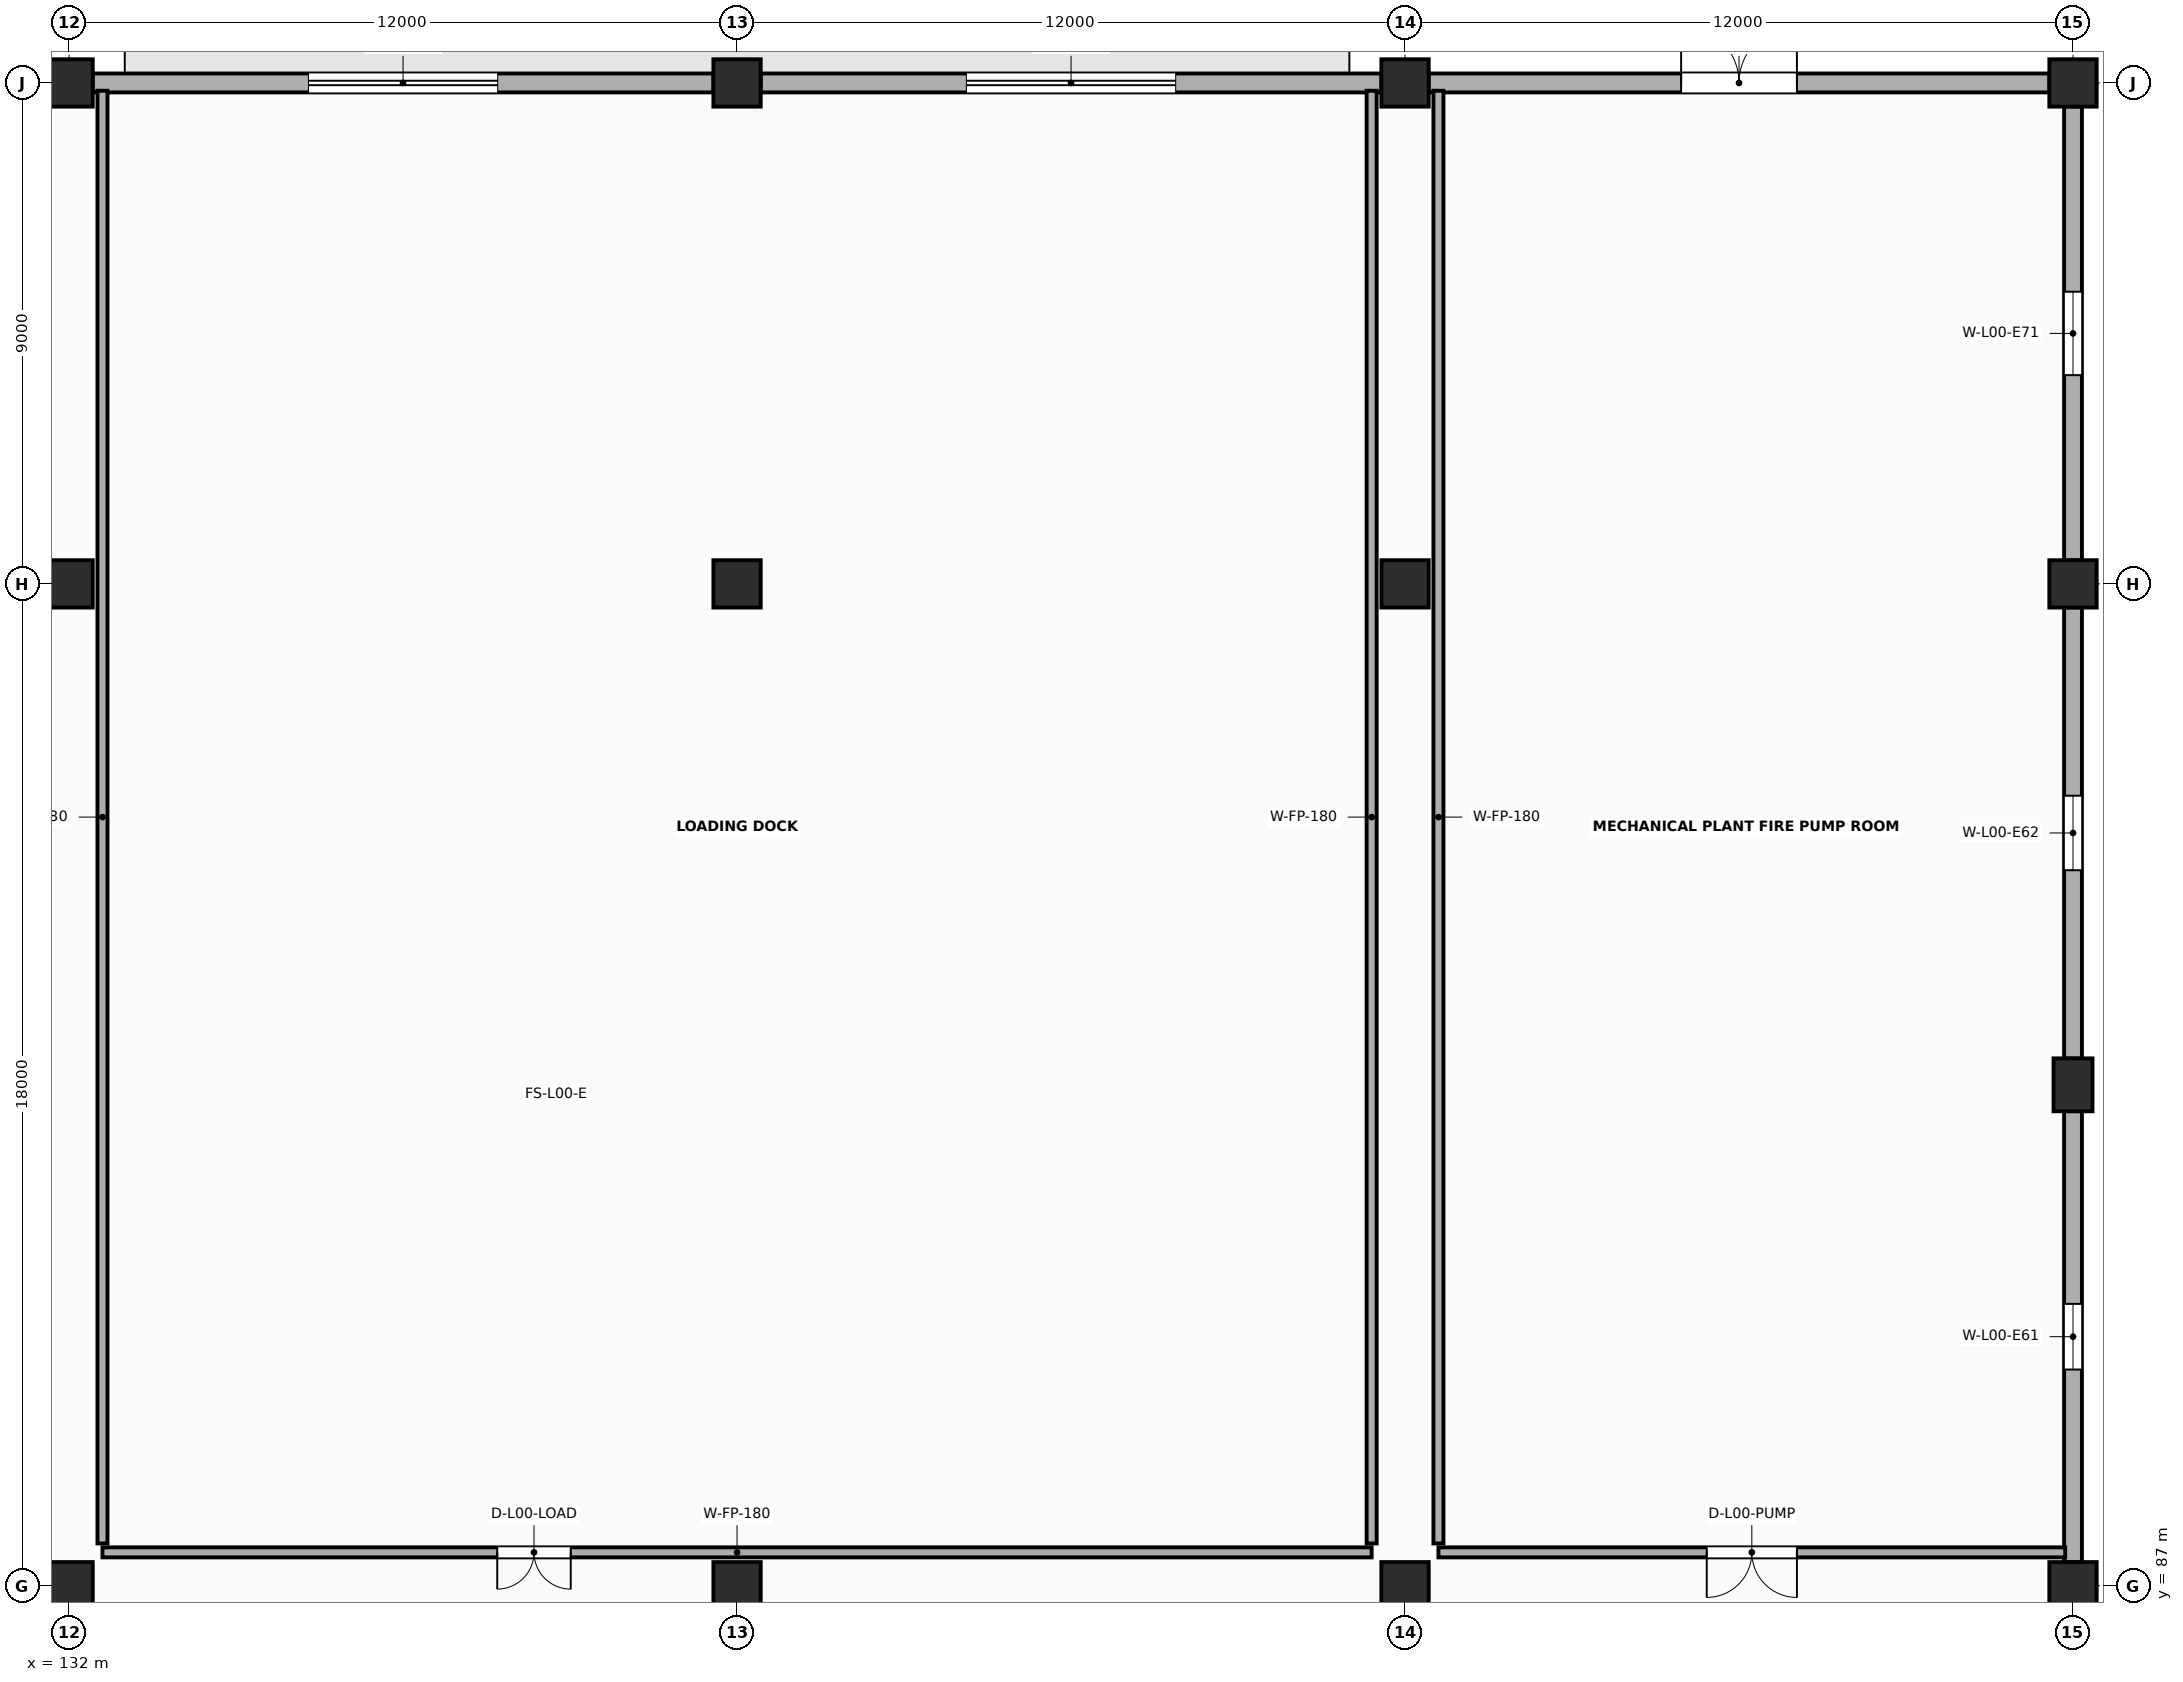
"""IFC4 building model, lengths in metres.
Left out: names, types, materials, properties, quantities, classifications, styles, units other than length and angle.
Written with IfcOpenShell. Run it as: python <this file> out.ifc"""

import sys

from ifc_helpers import new_model, si_unit, direction, frame, frame_2d, origin, origin_2d, place, context, subcontext, project, spatial, rectangle, extrude, element, fill, save


model = new_model("IFC4")
c1 = context("Model", 3, precision=1e-05, world=origin(), true_north=direction((0.0, 1.0)))
c2 = subcontext(c1, "Body", "Model", "MODEL_VIEW")
j1 = project(units=[si_unit("LENGTHUNIT", "METRE"), si_unit("PLANEANGLEUNIT", "RADIAN")], contexts=[c1])
p1 = place(None, origin())
s1 = spatial("IfcSite", under=j1, at=p1, CompositionType="ELEMENT")
p2 = place(p1, origin())
s2 = spatial("IfcBuilding", under=s1, at=p2, CompositionType="ELEMENT")
p3 = place(p2, origin())
s3 = spatial("IfcBuildingStorey", under=s2, at=p3, CompositionType="ELEMENT", Elevation=0.0)
for number, where, z_axis, x_axis in (
    (1, (132.0, 87.0, 0.0), (0.0, 0.0, 1.0), (1.0, 0.0, 0.0)),
    (2, (132.0, 105.0, 0.0), (0.0, 0.0, 1.0), (1.0, 0.0, 0.0)),
    (3, (132.0, 114.0, 0.0), (0.0, 0.0, 1.0), (1.0, 0.0, 0.0)),
    (4, (144.0, 87.0, 0.0), (0.0, 0.0, 1.0), (1.0, 0.0, 0.0)),
    (5, (144.0, 105.0, 0.0), (0.0, 0.0, 1.0), (1.0, 0.0, 0.0)),
    (6, (144.0, 114.0, 0.0), (0.0, 0.0, 1.0), (1.0, 0.0, 0.0)),
    (7, (156.0, 87.0, 0.0), (0.0, 0.0, 1.0), (1.0, 0.0, 0.0)),
    (8, (156.0, 105.0, 0.0), (0.0, 0.0, 1.0), (1.0, 0.0, 0.0)),
    (9, (156.0, 114.0, 0.0), (0.0, 0.0, 1.0), (1.0, 0.0, 0.0)),
    (10, (168.0, 87.0, 0.0), (0.0, 0.0, 1.0), (1.0, 0.0, 0.0)),
    (11, (168.0, 105.0, 0.0), (0.0, 0.0, 1.0), (1.0, 0.0, 0.0)),
    (12, (168.0, 114.0, 0.0), (0.0, 0.0, 1.0), (1.0, 0.0, 0.0)),
):
    element("IfcColumn", number, at=place(p3, frame(where, z_axis=z_axis, x_axis=x_axis)), inside=s3, PredefinedType="COLUMN", context=c2, shape_type="SweptSolid", body=[
        extrude(rectangle(XDim=0.85, YDim=0.85, at=origin_2d()), origin(), (0.0, 0.0, 1.0), 5.4),
    ])
p4 = place(p3, frame((168.0, 96.0, 0.0), z_axis=(0.0, 0.0, 1.0), x_axis=(1.0, 0.0, 0.0)))
e13 = element("IfcColumn", 13, at=p4, inside=s3, PredefinedType="PILASTER", context=c2, shape_type="SweptSolid", body=[
    extrude(rectangle(XDim=0.7, YDim=0.95, at=origin_2d()), origin(), (0.0, 0.0, 1.0), 5.4),
])
p5 = place(p3, frame((132.423, 114.0, 0.0), z_axis=(0.0, 0.0, 1.0), x_axis=(1.0, 0.0, 0.0)))
e14 = element("IfcWall", 14, at=p5, inside=s3, PredefinedType="SOLIDWALL", context=c2, shape_type="SweptSolid", body=[
    extrude(rectangle(XDim=11.154, YDim=0.34, at=frame_2d((5.577, 0.0))), origin(), (0.0, 0.0, 1.0), 3.85),
])
p6 = place(p5, frame((3.877, 0.0, 0.0)))
e15 = element("IfcOpeningElement", 15, at=p6, cuts=e14, PredefinedType="OPENING", context=c2, shape_type="SweptSolid", body=[
    extrude(rectangle(XDim=3.4, YDim=2.85, at=frame_2d((1.7, 1.425))), frame((0.0, 0.185, 0.0), z_axis=(0.0, -1.0, 0.0), x_axis=(1.0, 0.0, 0.0)), (0.0, 0.0, 1.0), 0.37),
])
p7 = place(p3, frame((144.423, 114.0, 0.0), z_axis=(0.0, 0.0, 1.0), x_axis=(1.0, 0.0, 0.0)))
e16 = element("IfcWall", 16, at=p7, inside=s3, PredefinedType="SOLIDWALL", context=c2, shape_type="SweptSolid", body=[
    extrude(rectangle(XDim=11.154, YDim=0.34, at=frame_2d((5.577, 0.0))), origin(), (0.0, 0.0, 1.0), 3.85),
])
p8 = place(p7, frame((3.697, 0.0, 0.0)))
e17 = element("IfcOpeningElement", 17, at=p8, cuts=e16, PredefinedType="OPENING", context=c2, shape_type="SweptSolid", body=[
    extrude(rectangle(XDim=3.76, YDim=3.0, at=frame_2d((1.88, 1.5))), frame((0.0, 0.185, 0.0), z_axis=(0.0, -1.0, 0.0), x_axis=(1.0, 0.0, 0.0)), (0.0, 0.0, 1.0), 0.37),
])
p9 = place(p3, frame((156.423, 114.0, 0.0), z_axis=(0.0, 0.0, 1.0), x_axis=(1.0, 0.0, 0.0)))
e18 = element("IfcWall", 18, at=p9, inside=s3, PredefinedType="SOLIDWALL", context=c2, shape_type="SweptSolid", body=[
    extrude(rectangle(XDim=11.154, YDim=0.34, at=frame_2d((5.577, 0.0))), origin(), (0.0, 0.0, 1.0), 3.85),
])
p10 = place(p9, frame((4.537, 0.0, 0.0)))
e19 = element("IfcOpeningElement", 19, at=p10, cuts=e18, PredefinedType="OPENING", context=c2, shape_type="SweptSolid", body=[
    extrude(rectangle(XDim=2.08, YDim=2.44, at=frame_2d((1.04, 1.22))), frame((0.0, 0.185, 0.0), z_axis=(0.0, -1.0, 0.0), x_axis=(1.0, 0.0, 0.0)), (0.0, 0.0, 1.0), 0.37),
])
p11 = place(p3, frame((168.0, 87.423, 0.0), z_axis=(0.0, 0.0, 1.0), x_axis=(0.0, 1.0, 0.0)))
e20 = element("IfcWall", 20, at=p11, inside=s3, PredefinedType="SOLIDWALL", context=c2, shape_type="SweptSolid", body=[
    extrude(rectangle(XDim=8.104, YDim=0.32, at=frame_2d((4.052, 0.0))), origin(), (0.0, 0.0, 1.0), 3.85),
])
p12 = place(p11, frame((3.462, 0.0, 0.55)))
e21 = element("IfcOpeningElement", 21, at=p12, cuts=e20, PredefinedType="OPENING", context=c2, shape_type="SweptSolid", body=[
    extrude(rectangle(XDim=1.18, YDim=1.58, at=frame_2d((0.59, 0.79))), frame((0.0, 0.175, 0.0), z_axis=(0.0, -1.0, 0.0), x_axis=(1.0, 0.0, 0.0)), (0.0, 0.0, 1.0), 0.35),
])
p13 = place(p3, frame((168.0, 96.473, 0.0), z_axis=(0.0, 0.0, 1.0), x_axis=(0.0, 1.0, 0.0)))
e22 = element("IfcWall", 22, at=p13, inside=s3, PredefinedType="SOLIDWALL", context=c2, shape_type="SweptSolid", body=[
    extrude(rectangle(XDim=8.104, YDim=0.32, at=frame_2d((4.052, 0.0))), origin(), (0.0, 0.0, 1.0), 3.85),
])
p14 = place(p13, frame((3.382, 0.0, 0.55)))
e23 = element("IfcOpeningElement", 23, at=p14, cuts=e22, PredefinedType="OPENING", context=c2, shape_type="SweptSolid", body=[
    extrude(rectangle(XDim=1.34, YDim=1.58, at=frame_2d((0.67, 0.79))), frame((0.0, 0.175, 0.0), z_axis=(0.0, -1.0, 0.0), x_axis=(1.0, 0.0, 0.0)), (0.0, 0.0, 1.0), 0.35),
])
p15 = place(p3, frame((168.0, 105.423, 0.0), z_axis=(0.0, 0.0, 1.0), x_axis=(0.0, 1.0, 0.0)))
e24 = element("IfcWall", 24, at=p15, inside=s3, PredefinedType="SOLIDWALL", context=c2, shape_type="SweptSolid", body=[
    extrude(rectangle(XDim=8.154, YDim=0.32, at=frame_2d((4.077, 0.0))), origin(), (0.0, 0.0, 1.0), 3.85),
])
p16 = place(p15, frame((3.327, 0.0, 0.55)))
e25 = element("IfcOpeningElement", 25, at=p16, cuts=e24, PredefinedType="OPENING", context=c2, shape_type="SweptSolid", body=[
    extrude(rectangle(XDim=1.5, YDim=1.58, at=frame_2d((0.75, 0.79))), frame((0.0, 0.175, 0.0), z_axis=(0.0, -1.0, 0.0), x_axis=(1.0, 0.0, 0.0)), (0.0, 0.0, 1.0), 0.35),
])
p17 = place(p3, frame((132.6, 87.6, 0.0), z_axis=(0.0, 0.0, 1.0), x_axis=(1.0, 0.0, 0.0)))
e26 = element("IfcWall", 26, at=p17, inside=s3, PredefinedType="SOLIDWALL", context=c2, shape_type="SweptSolid", body=[
    extrude(rectangle(XDim=22.8, YDim=0.18, at=frame_2d((11.4, 0.0))), origin(), (0.0, 0.0, 1.0), 2.75),
])
p18 = place(p17, frame((7.092, 0.0, 0.0)))
e27 = element("IfcOpeningElement", 27, at=p18, cuts=e26, PredefinedType="OPENING", context=c2, shape_type="SweptSolid", body=[
    extrude(rectangle(XDim=1.32, YDim=2.26, at=frame_2d((0.66, 1.13))), frame((0.0, 0.105, 0.0), z_axis=(0.0, -1.0, 0.0), x_axis=(1.0, 0.0, 0.0)), (0.0, 0.0, 1.0), 0.21),
])
for number, where, z_axis, x_axis in (
    (28, (132.6, 87.76, 0.0), (0.0, 0.0, 1.0), (0.0, 1.0, 0.0)),
    (29, (155.4, 87.76, 0.0), (0.0, 0.0, 1.0), (0.0, 1.0, 0.0)),
):
    element("IfcWall", number, at=place(p3, frame(where, z_axis=z_axis, x_axis=x_axis)), inside=s3, PredefinedType="SOLIDWALL", context=c2, shape_type="SweptSolid", body=[
        extrude(rectangle(XDim=26.1, YDim=0.18, at=frame_2d((13.05, 0.0))), origin(), (0.0, 0.0, 1.0), 2.75),
    ])
p19 = place(p3, frame((156.6, 87.6, 0.0), z_axis=(0.0, 0.0, 1.0), x_axis=(1.0, 0.0, 0.0)))
e30 = element("IfcWall", 30, at=p19, inside=s3, PredefinedType="SOLIDWALL", context=c2, shape_type="SweptSolid", body=[
    extrude(rectangle(XDim=11.26, YDim=0.18, at=frame_2d((5.63, 0.0))), origin(), (0.0, 0.0, 1.0), 2.75),
])
p20 = place(p19, frame((4.82, 0.0, 0.0)))
e31 = element("IfcOpeningElement", 31, at=p20, cuts=e30, PredefinedType="OPENING", context=c2, shape_type="SweptSolid", body=[
    extrude(rectangle(XDim=1.62, YDim=2.3, at=frame_2d((0.81, 1.15))), frame((0.0, 0.105, 0.0), z_axis=(0.0, -1.0, 0.0), x_axis=(1.0, 0.0, 0.0)), (0.0, 0.0, 1.0), 0.21),
])
p21 = place(p3, frame((156.6, 87.76, 0.0), z_axis=(0.0, 0.0, 1.0), x_axis=(0.0, 1.0, 0.0)))
e32 = element("IfcWall", 32, at=p21, inside=s3, PredefinedType="SOLIDWALL", context=c2, shape_type="SweptSolid", body=[
    extrude(rectangle(XDim=26.1, YDim=0.18, at=frame_2d((13.05, 0.0))), origin(), (0.0, 0.0, 1.0), 2.75),
])
p22 = place(p6, origin())
e33 = element("IfcDoor", 33, at=p22, inside=s3, OperationType="ROLLINGUP", PredefinedType="USERDEFINED", context=c2, shape_type="SweptSolid", body=[
    extrude(rectangle(XDim=3.4, YDim=2.85, at=frame_2d((1.7, 1.425))), frame((0.0, 0.025, 0.0), z_axis=(0.0, -1.0, 0.0), x_axis=(1.0, 0.0, 0.0)), (0.0, 0.0, 1.0), 0.05),
])
fill(e15, e33)
p23 = place(p8, origin())
e34 = element("IfcDoor", 34, at=p23, inside=s3, OperationType="ROLLINGUP", PredefinedType="USERDEFINED", context=c2, shape_type="SweptSolid", body=[
    extrude(rectangle(XDim=3.76, YDim=3.0, at=frame_2d((1.88, 1.5))), frame((0.0, 0.025, 0.0), z_axis=(0.0, -1.0, 0.0), x_axis=(1.0, 0.0, 0.0)), (0.0, 0.0, 1.0), 0.05),
])
fill(e17, e34)
p24 = place(p10, origin())
e35 = element("IfcDoor", 35, at=p24, inside=s3, OperationType="DOUBLE_DOOR_SINGLE_SWING", PredefinedType="DOOR", context=c2, shape_type="SweptSolid", body=[
    extrude(rectangle(XDim=2.08, YDim=2.44, at=frame_2d((1.04, 1.22))), frame((0.0, 0.025, 0.0), z_axis=(0.0, -1.0, 0.0), x_axis=(1.0, 0.0, 0.0)), (0.0, 0.0, 1.0), 0.05),
])
fill(e19, e35)
p25 = place(p12, origin())
e36 = element("IfcWindow", 36, at=p25, inside=s3, PartitioningType="SINGLE_PANEL", PredefinedType="WINDOW", context=c2, shape_type="SweptSolid", body=[
    extrude(rectangle(XDim=1.18, YDim=1.58, at=frame_2d((0.59, 0.79))), frame((0.0, 0.03, 0.0), z_axis=(0.0, -1.0, 0.0), x_axis=(1.0, 0.0, 0.0)), (0.0, 0.0, 1.0), 0.06),
])
fill(e21, e36)
p26 = place(p14, origin())
e37 = element("IfcWindow", 37, at=p26, inside=s3, PartitioningType="SINGLE_PANEL", PredefinedType="WINDOW", context=c2, shape_type="SweptSolid", body=[
    extrude(rectangle(XDim=1.34, YDim=1.58, at=frame_2d((0.67, 0.79))), frame((0.0, 0.03, 0.0), z_axis=(0.0, -1.0, 0.0), x_axis=(1.0, 0.0, 0.0)), (0.0, 0.0, 1.0), 0.06),
])
fill(e23, e37)
p27 = place(p16, origin())
e38 = element("IfcWindow", 38, at=p27, inside=s3, PartitioningType="SINGLE_PANEL", PredefinedType="WINDOW", context=c2, shape_type="SweptSolid", body=[
    extrude(rectangle(XDim=1.5, YDim=1.58, at=frame_2d((0.75, 0.79))), frame((0.0, 0.03, 0.0), z_axis=(0.0, -1.0, 0.0), x_axis=(1.0, 0.0, 0.0)), (0.0, 0.0, 1.0), 0.06),
])
fill(e25, e38)
p28 = place(p18, origin())
e39 = element("IfcDoor", 39, at=p28, inside=s3, OperationType="DOUBLE_DOOR_SINGLE_SWING", PredefinedType="DOOR", context=c2, shape_type="SweptSolid", body=[
    extrude(rectangle(XDim=1.32, YDim=2.26, at=frame_2d((0.66, 1.13))), frame((0.0, 0.025, 0.0), z_axis=(0.0, -1.0, 0.0), x_axis=(1.0, 0.0, 0.0)), (0.0, 0.0, 1.0), 0.05),
])
fill(e27, e39)
p29 = place(p20, origin())
e40 = element("IfcDoor", 40, at=p29, inside=s3, OperationType="DOUBLE_DOOR_SINGLE_SWING", PredefinedType="DOOR", context=c2, shape_type="SweptSolid", body=[
    extrude(rectangle(XDim=1.62, YDim=2.3, at=frame_2d((0.81, 1.15))), frame((0.0, 0.025, 0.0), z_axis=(0.0, -1.0, 0.0), x_axis=(1.0, 0.0, 0.0)), (0.0, 0.0, 1.0), 0.05),
])
fill(e31, e40)
save(model, sys.argv[1])
